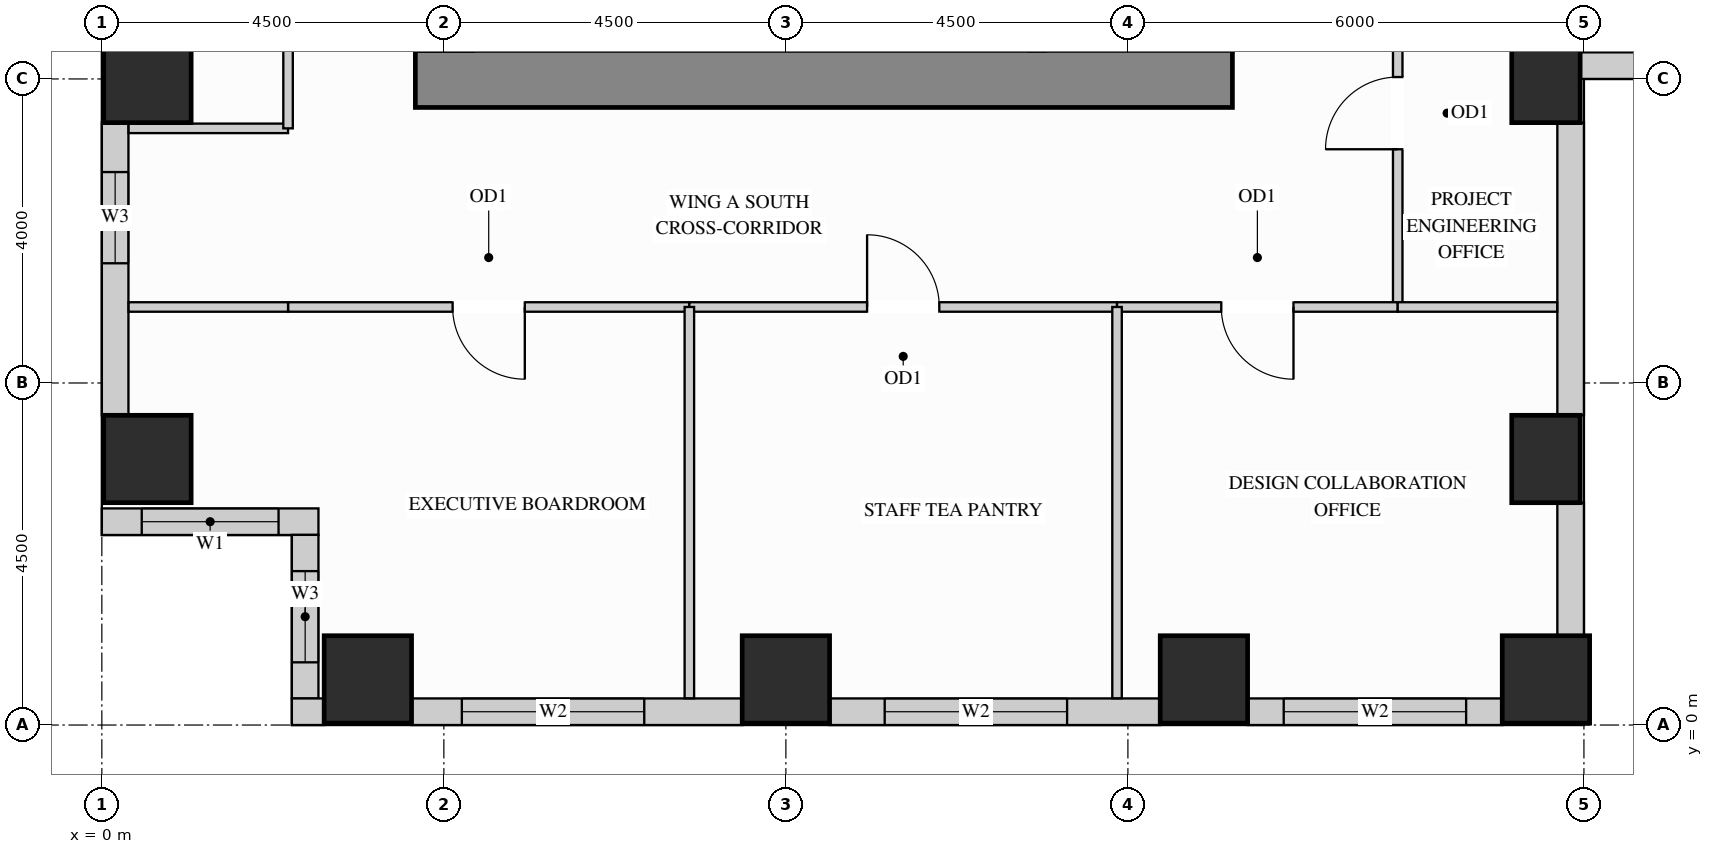
"""IFC4 building model, lengths in metres.
Left out: names, types, materials, properties, quantities, classifications, styles, units other than length and angle.
Written with IfcOpenShell. Run it as: python <this file> out.ifc"""

import sys

from ifc_helpers import new_model, si_unit, direction, frame, frame_2d, origin, origin_2d, place, context, subcontext, project, spatial, rectangle, extrude, source, transform, mapped, element, fill, save


model = new_model("IFC4")
c1 = context("Model", 3, precision=1e-05, world=origin(), true_north=direction((0.0, 1.0)))
c2 = subcontext(c1, "Body", "Model", "MODEL_VIEW")
j1 = project(units=[si_unit("LENGTHUNIT", "METRE"), si_unit("PLANEANGLEUNIT", "RADIAN")], contexts=[c1])
p1 = place(None, origin())
s1 = spatial("IfcSite", under=j1, at=p1, CompositionType="ELEMENT")
p2 = place(p1, origin())
s2 = spatial("IfcBuilding", under=s1, at=p2, CompositionType="ELEMENT")
p3 = place(p2, frame((0.0, 0.0, 131.4)))
s3 = spatial("IfcBuildingStorey", under=s2, at=p3, CompositionType="ELEMENT", Elevation=131.4)
m1 = source(origin(), c2, "Body", "SweptSolid", [
    extrude(rectangle(XDim=0.9, YDim=1.15, at=origin_2d()), origin(), (0.0, 0.0, 1.0), 3.38),
])
for number, where, z_axis, x_axis in (
    (1, (19.0, 3.5, 0.0), (0.0, 0.0, 1.0), (1.0, 0.0, 0.0)),
    (2, (19.0, 8.5, 0.0), (0.0, 0.0, 1.0), (1.0, 0.0, 0.0)),
):
    element("IfcColumn", number, at=place(p3, frame(where, z_axis=z_axis, x_axis=x_axis)), inside=s3, PredefinedType="COLUMN", context=c2, shape_type="MappedRepresentation", body=[
        mapped(m1, transform((0.0, 0.0, 0.0), x_axis=(1.0, 0.0, 0.0), y_axis=(0.0, 1.0, 0.0), z_axis=(0.0, 0.0, 1.0))),
    ])
m2 = source(origin(), c2, "Body", "SweptSolid", [
    extrude(rectangle(XDim=1.15, YDim=1.15, at=origin_2d()), origin(), (0.0, 0.0, 1.0), 3.38),
])
for number, where, z_axis, x_axis in (
    (3, (14.5, 0.6, 0.0), (0.0, 0.0, 1.0), (1.0, 0.0, 0.0)),
    (4, (19.0, 0.6, 0.0), (0.0, 0.0, 1.0), (1.0, 0.0, 0.0)),
    (5, (3.5, 0.6, 0.0), (0.0, 0.0, 1.0), (1.0, 0.0, 0.0)),
    (6, (9.0, 0.6, 0.0), (0.0, 0.0, 1.0), (1.0, 0.0, 0.0)),
    (7, (0.6, 3.5, 0.0), (0.0, 0.0, 1.0), (1.0, 0.0, 0.0)),
    (8, (0.6, 8.5, 0.0), (0.0, 0.0, 1.0), (1.0, 0.0, 0.0)),
):
    element("IfcColumn", number, at=place(p3, frame(where, z_axis=z_axis, x_axis=x_axis)), inside=s3, PredefinedType="COLUMN", context=c2, shape_type="MappedRepresentation", body=[
        mapped(m2, transform((0.0, 0.0, 0.0), x_axis=(1.0, 0.0, 0.0), y_axis=(0.0, 1.0, 0.0), z_axis=(0.0, 0.0, 1.0))),
    ])
m3 = source(origin(), c2, "Body", "SweptSolid", [
    extrude(rectangle(XDim=10.75, YDim=0.75, at=frame_2d((5.375, 0.0))), origin(), (0.0, 0.0, 1.0), 3.38),
])
p4 = place(p3, frame((4.125, 8.5, 0.0), z_axis=(0.0, 0.0, 1.0), x_axis=(1.0, 0.0, 0.0)))
e9 = element("IfcWall", 9, at=p4, inside=s3, PredefinedType="SHEAR", context=c2, shape_type="MappedRepresentation", body=[
    mapped(m3, transform((0.0, 0.0, 0.0), x_axis=(1.0, 0.0, 0.0), y_axis=(0.0, 1.0, 0.0), z_axis=(0.0, 0.0, 1.0))),
])
p5 = place(p3, frame((0.175, 7.927, 0.0), z_axis=(0.0, 0.0, 1.0), x_axis=(0.0, -1.0, 0.0)))
e10 = element("IfcWall", 10, at=p5, inside=s3, PredefinedType="SOLIDWALL", context=c2, shape_type="SweptSolid", body=[
    extrude(rectangle(XDim=3.854, YDim=0.35, at=frame_2d((1.927, 0.0))), origin(), (0.0, 0.0, 1.0), 3.365),
])
p6 = place(p5, frame((0.652, 0.0, 0.78)))
e11 = element("IfcOpeningElement", 11, at=p6, cuts=e10, PredefinedType="OPENING", context=c2, shape_type="SweptSolid", body=[
    extrude(rectangle(XDim=1.2, YDim=2.1, at=frame_2d((0.6, 1.05))), frame((0.0, 0.185, 0.0), z_axis=(0.0, -1.0, 0.0), x_axis=(1.0, 0.0, 0.0)), (0.0, 0.0, 1.0), 0.37),
])
p7 = place(p3, frame((0.0, 2.675, 0.0), z_axis=(0.0, 0.0, 1.0), x_axis=(1.0, 0.0, 0.0)))
e12 = element("IfcWall", 12, at=p7, inside=s3, PredefinedType="SOLIDWALL", context=c2, shape_type="SweptSolid", body=[
    extrude(rectangle(XDim=2.85, YDim=0.35, at=frame_2d((1.425, 0.0))), origin(), (0.0, 0.0, 1.0), 3.365),
])
p8 = place(p7, frame((0.525, 0.0, 0.78)))
e13 = element("IfcOpeningElement", 13, at=p8, cuts=e12, PredefinedType="OPENING", context=c2, shape_type="SweptSolid", body=[
    extrude(rectangle(XDim=1.8, YDim=2.1, at=frame_2d((0.9, 1.05))), frame((0.0, 0.185, 0.0), z_axis=(0.0, -1.0, 0.0), x_axis=(1.0, 0.0, 0.0)), (0.0, 0.0, 1.0), 0.37),
])
p9 = place(p3, frame((2.675, 2.502, 0.0), z_axis=(0.0, 0.0, 1.0), x_axis=(0.0, -1.0, 0.0)))
e14 = element("IfcWall", 14, at=p9, inside=s3, PredefinedType="SOLIDWALL", context=c2, shape_type="SweptSolid", body=[
    extrude(rectangle(XDim=2.154, YDim=0.35, at=frame_2d((1.077, 0.0))), origin(), (0.0, 0.0, 1.0), 3.365),
])
p10 = place(p9, frame((0.477, 0.0, 0.78)))
e15 = element("IfcOpeningElement", 15, at=p10, cuts=e14, PredefinedType="OPENING", context=c2, shape_type="SweptSolid", body=[
    extrude(rectangle(XDim=1.2, YDim=2.1, at=frame_2d((0.6, 1.05))), frame((0.0, 0.185, 0.0), z_axis=(0.0, -1.0, 0.0), x_axis=(1.0, 0.0, 0.0)), (0.0, 0.0, 1.0), 0.37),
])
m4 = source(origin(), c2, "Body", "SweptSolid", [
    extrude(rectangle(XDim=0.427, YDim=0.35, at=frame_2d((0.213, 0.0))), origin(), (0.0, 0.0, 1.0), 3.365),
])
p11 = place(p3, frame((2.5, 0.175, 0.0), z_axis=(0.0, 0.0, 1.0), x_axis=(1.0, 0.0, 0.0)))
e16 = element("IfcWall", 16, at=p11, inside=s3, PredefinedType="SOLIDWALL", context=c2, shape_type="MappedRepresentation", body=[
    mapped(m4, transform((0.0, 0.0, 0.0), x_axis=(1.0, 0.0, 0.0), y_axis=(0.0, 1.0, 0.0), z_axis=(0.0, 0.0, 1.0))),
])
p12 = place(p3, frame((4.073, 0.175, 0.0), z_axis=(0.0, 0.0, 1.0), x_axis=(1.0, 0.0, 0.0)))
e17 = element("IfcWall", 17, at=p12, inside=s3, PredefinedType="SOLIDWALL", context=c2, shape_type="SweptSolid", body=[
    extrude(rectangle(XDim=4.354, YDim=0.35, at=frame_2d((2.177, 0.0))), origin(), (0.0, 0.0, 1.0), 3.365),
])
p13 = place(p12, frame((0.664, 0.0, 0.78)))
e18 = element("IfcOpeningElement", 18, at=p13, cuts=e17, PredefinedType="OPENING", context=c2, shape_type="SweptSolid", body=[
    extrude(rectangle(XDim=2.4, YDim=2.1, at=frame_2d((1.2, 1.05))), frame((0.0, 0.185, 0.0), z_axis=(0.0, -1.0, 0.0), x_axis=(1.0, 0.0, 0.0)), (0.0, 0.0, 1.0), 0.37),
])
p14 = place(p3, frame((9.573, 0.175, 0.0), z_axis=(0.0, 0.0, 1.0), x_axis=(1.0, 0.0, 0.0)))
e19 = element("IfcWall", 19, at=p14, inside=s3, PredefinedType="SOLIDWALL", context=c2, shape_type="SweptSolid", body=[
    extrude(rectangle(XDim=4.354, YDim=0.35, at=frame_2d((2.177, 0.0))), origin(), (0.0, 0.0, 1.0), 3.365),
])
p15 = place(p14, frame((0.727, 0.0, 0.78)))
e20 = element("IfcOpeningElement", 20, at=p15, cuts=e19, PredefinedType="OPENING", context=c2, shape_type="SweptSolid", body=[
    extrude(rectangle(XDim=2.4, YDim=2.1, at=frame_2d((1.2, 1.05))), frame((0.0, 0.185, 0.0), z_axis=(0.0, -1.0, 0.0), x_axis=(1.0, 0.0, 0.0)), (0.0, 0.0, 1.0), 0.37),
])
p16 = place(p3, frame((15.073, 0.175, 0.0), z_axis=(0.0, 0.0, 1.0), x_axis=(1.0, 0.0, 0.0)))
e21 = element("IfcWall", 21, at=p16, inside=s3, PredefinedType="SOLIDWALL", context=c2, shape_type="SweptSolid", body=[
    extrude(rectangle(XDim=3.354, YDim=0.35, at=frame_2d((1.677, 0.0))), origin(), (0.0, 0.0, 1.0), 3.365),
])
p17 = place(p16, frame((0.477, 0.0, 0.78)))
e22 = element("IfcOpeningElement", 22, at=p17, cuts=e21, PredefinedType="OPENING", context=c2, shape_type="SweptSolid", body=[
    extrude(rectangle(XDim=2.4, YDim=2.1, at=frame_2d((1.2, 1.05))), frame((0.0, 0.185, 0.0), z_axis=(0.0, -1.0, 0.0), x_axis=(1.0, 0.0, 0.0)), (0.0, 0.0, 1.0), 0.37),
])
m5 = source(origin(), c2, "Body", "SweptSolid", [
    extrude(rectangle(XDim=1.754, YDim=0.35, at=frame_2d((0.877, 0.0))), origin(), (0.0, 0.0, 1.0), 2.519),
])
p18 = place(p3, frame((19.325, 1.173, 0.0), z_axis=(0.0, 0.0, 1.0), x_axis=(0.0, 1.0, 0.0)))
e23 = element("IfcWall", 23, at=p18, inside=s3, PredefinedType="SOLIDWALL", context=c2, shape_type="MappedRepresentation", body=[
    mapped(m5, transform((0.0, 0.0, 0.0), x_axis=(1.0, 0.0, 0.0), y_axis=(0.0, 1.0, 0.0), z_axis=(0.0, 0.0, 1.0))),
])
m6 = source(origin(), c2, "Body", "SweptSolid", [
    extrude(rectangle(XDim=3.854, YDim=0.35, at=frame_2d((1.927, 0.0))), origin(), (0.0, 0.0, 1.0), 2.519),
])
p19 = place(p3, frame((19.325, 4.073, 0.0), z_axis=(0.0, 0.0, 1.0), x_axis=(0.0, 1.0, 0.0)))
e24 = element("IfcWall", 24, at=p19, inside=s3, PredefinedType="SOLIDWALL", context=c2, shape_type="MappedRepresentation", body=[
    mapped(m6, transform((0.0, 0.0, 0.0), x_axis=(1.0, 0.0, 0.0), y_axis=(0.0, 1.0, 0.0), z_axis=(0.0, 0.0, 1.0))),
])
p20 = place(p3, frame((19.448, 8.675, 0.0), z_axis=(0.0, 0.0, 1.0), x_axis=(1.0, 0.0, 0.0)))
e25 = element("IfcWall", 25, at=p20, inside=s3, PredefinedType="SOLIDWALL", context=c2, shape_type="SweptSolid", body=[
    extrude(rectangle(XDim=3.504, YDim=0.35, at=frame_2d((1.752, 0.0))), origin(), (0.0, 0.0, 1.0), 3.365),
])
p21 = place(p20, frame((1.002, 0.0, 0.78)))
e26 = element("IfcOpeningElement", 26, at=p21, cuts=e25, PredefinedType="OPENING", context=c2, shape_type="SweptSolid", body=[
    extrude(rectangle(XDim=1.5, YDim=2.0, at=frame_2d((0.75, 1.0))), frame((0.0, 0.185, 0.0), z_axis=(0.0, -1.0, 0.0), x_axis=(1.0, 0.0, 0.0)), (0.0, 0.0, 1.0), 0.37),
])
p22 = place(p3, frame((17.05, 5.5, 0.0), z_axis=(0.0, 0.0, 1.0), x_axis=(0.0, 1.0, 0.0)))
e27 = element("IfcWall", 27, at=p22, inside=s3, PredefinedType="PARTITIONING", context=c2, shape_type="SweptSolid", body=[
    extrude(rectangle(XDim=5.1, YDim=0.125, at=frame_2d((2.55, 0.0))), origin(), (0.0, 0.0, 1.0), 3.365),
])
p23 = place(p22, frame((2.075, 0.0, 0.0)))
e28 = element("IfcOpeningElement", 28, at=p23, cuts=e27, PredefinedType="OPENING", context=c2, shape_type="SweptSolid", body=[
    extrude(rectangle(XDim=0.95, YDim=2.15, at=frame_2d((0.475, 1.075))), frame((0.0, 0.073, 0.0), z_axis=(0.0, -1.0, 0.0), x_axis=(1.0, 0.0, 0.0)), (0.0, 0.0, 1.0), 0.145),
])
m7 = source(origin(), c2, "Body", "SweptSolid", [
    extrude(rectangle(XDim=2.098, YDim=0.125, at=frame_2d((1.049, 0.0))), origin(), (0.0, 0.0, 1.0), 3.365),
])
p24 = place(p3, frame((0.352, 7.85, 0.0), z_axis=(0.0, 0.0, 1.0), x_axis=(1.0, 0.0, 0.0)))
e29 = element("IfcWall", 29, at=p24, inside=s3, PredefinedType="PARTITIONING", context=c2, shape_type="MappedRepresentation", body=[
    mapped(m7, transform((0.0, 0.0, 0.0), x_axis=(1.0, 0.0, 0.0), y_axis=(0.0, 1.0, 0.0), z_axis=(0.0, 0.0, 1.0))),
])
p25 = place(p3, frame((2.45, 5.5, 0.0), z_axis=(0.0, 0.0, 1.0), x_axis=(1.0, 0.0, 0.0)))
e30 = element("IfcWall", 30, at=p25, inside=s3, PredefinedType="PARTITIONING", context=c2, shape_type="SweptSolid", body=[
    extrude(rectangle(XDim=5.28, YDim=0.125, at=frame_2d((2.64, 0.0))), origin(), (0.0, 0.0, 1.0), 3.365),
])
p26 = place(p25, frame((2.165, 0.0, 0.0)))
e31 = element("IfcOpeningElement", 31, at=p26, cuts=e30, PredefinedType="OPENING", context=c2, shape_type="SweptSolid", body=[
    extrude(rectangle(XDim=0.95, YDim=2.15, at=frame_2d((0.475, 1.075))), frame((0.0, 0.073, 0.0), z_axis=(0.0, -1.0, 0.0), x_axis=(1.0, 0.0, 0.0)), (0.0, 0.0, 1.0), 0.145),
])
p27 = place(p3, frame((7.73, 5.5, 0.0), z_axis=(0.0, 0.0, 1.0), x_axis=(1.0, 0.0, 0.0)))
e32 = element("IfcWall", 32, at=p27, inside=s3, PredefinedType="PARTITIONING", context=c2, shape_type="SweptSolid", body=[
    extrude(rectangle(XDim=5.627, YDim=0.125, at=frame_2d((2.813, 0.0))), origin(), (0.0, 0.0, 1.0), 3.365),
])
p28 = place(p27, frame((2.338, 0.0, 0.0)))
e33 = element("IfcOpeningElement", 33, at=p28, cuts=e32, PredefinedType="OPENING", context=c2, shape_type="SweptSolid", body=[
    extrude(rectangle(XDim=0.95, YDim=2.15, at=frame_2d((0.475, 1.075))), frame((0.0, 0.073, 0.0), z_axis=(0.0, -1.0, 0.0), x_axis=(1.0, 0.0, 0.0)), (0.0, 0.0, 1.0), 0.145),
])
p29 = place(p3, frame((13.357, 5.5, 0.0), z_axis=(0.0, 0.0, 1.0), x_axis=(1.0, 0.0, 0.0)))
e34 = element("IfcWall", 34, at=p29, inside=s3, PredefinedType="PARTITIONING", context=c2, shape_type="SweptSolid", body=[
    extrude(rectangle(XDim=3.693, YDim=0.125, at=frame_2d((1.847, 0.0))), origin(), (0.0, 0.0, 1.0), 3.365),
])
p30 = place(p29, frame((1.372, 0.0, 0.0)))
e35 = element("IfcOpeningElement", 35, at=p30, cuts=e34, PredefinedType="OPENING", context=c2, shape_type="SweptSolid", body=[
    extrude(rectangle(XDim=0.95, YDim=2.15, at=frame_2d((0.475, 1.075))), frame((0.0, 0.073, 0.0), z_axis=(0.0, -1.0, 0.0), x_axis=(1.0, 0.0, 0.0)), (0.0, 0.0, 1.0), 0.145),
])
for number, where, z_axis, x_axis in (
    (36, (0.352, 5.5, 0.0), (0.0, 0.0, 1.0), (1.0, 0.0, 0.0)),
    (37, (17.05, 5.5, 0.0), (0.0, 0.0, 1.0), (1.0, 0.0, 0.0)),
):
    element("IfcWall", number, at=place(p3, frame(where, z_axis=z_axis, x_axis=x_axis)), inside=s3, PredefinedType="PARTITIONING", context=c2, shape_type="MappedRepresentation", body=[
        mapped(m7, transform((0.0, 0.0, 0.0), x_axis=(1.0, 0.0, 0.0), y_axis=(0.0, 1.0, 0.0), z_axis=(0.0, 0.0, 1.0))),
    ])
m8 = source(origin(), c2, "Body", "SweptSolid", [
    extrude(rectangle(XDim=5.148, YDim=0.125, at=frame_2d((2.574, 0.0))), origin(), (0.0, 0.0, 1.0), 3.365),
])
for number, where, z_axis, x_axis in (
    (38, (7.73, 0.352, 0.0), (0.0, 0.0, 1.0), (0.0, 1.0, 0.0)),
    (39, (13.357, 0.352, 0.0), (0.0, 0.0, 1.0), (0.0, 1.0, 0.0)),
):
    element("IfcWall", number, at=place(p3, frame(where, z_axis=z_axis, x_axis=x_axis)), inside=s3, PredefinedType="PARTITIONING", context=c2, shape_type="MappedRepresentation", body=[
        mapped(m8, transform((0.0, 0.0, 0.0), x_axis=(1.0, 0.0, 0.0), y_axis=(0.0, 1.0, 0.0), z_axis=(0.0, 0.0, 1.0))),
    ])
p31 = place(p3, frame((2.45, 7.85, 0.0), z_axis=(0.0, 0.0, 1.0), x_axis=(0.0, 1.0, 0.0)))
e40 = element("IfcWall", 40, at=p31, inside=s3, PredefinedType="PARTITIONING", context=c2, shape_type="SweptSolid", body=[
    extrude(rectangle(XDim=7.25, YDim=0.125, at=frame_2d((3.625, 0.0))), origin(), (0.0, 0.0, 1.0), 3.365),
])
p32 = place(p31, frame((3.15, 0.0, 0.0)))
e41 = element("IfcOpeningElement", 41, at=p32, cuts=e40, PredefinedType="OPENING", context=c2, shape_type="SweptSolid", body=[
    extrude(rectangle(XDim=0.95, YDim=2.15, at=frame_2d((0.475, 1.075))), frame((0.0, 0.073, 0.0), z_axis=(0.0, -1.0, 0.0), x_axis=(1.0, 0.0, 0.0)), (0.0, 0.0, 1.0), 0.145),
])
m9 = source(origin(), c2, "Body", "SweptSolid", [
    extrude(rectangle(XDim=0.95, YDim=2.15, at=frame_2d((0.475, 1.075))), frame((0.0, 0.025, 0.0), z_axis=(0.0, -1.0, 0.0), x_axis=(1.0, 0.0, 0.0)), (0.0, 0.0, 1.0), 0.05),
])
p33 = place(p23, origin())
e42 = element("IfcDoor", 42, at=p33, inside=s3, OperationType="SINGLE_SWING_LEFT", PredefinedType="DOOR", context=c2, shape_type="MappedRepresentation", body=[
    mapped(m9, transform((0.0, 0.0, 0.0), x_axis=(1.0, 0.0, 0.0), y_axis=(0.0, 1.0, 0.0), z_axis=(0.0, 0.0, 1.0))),
])
fill(e28, e42)
p34 = place(p26, origin())
e43 = element("IfcDoor", 43, at=p34, inside=s3, OperationType="SINGLE_SWING_RIGHT", PredefinedType="DOOR", context=c2, shape_type="MappedRepresentation", body=[
    mapped(m9, transform((0.0, 0.0, 0.0), x_axis=(1.0, 0.0, 0.0), y_axis=(0.0, 1.0, 0.0), z_axis=(0.0, 0.0, 1.0))),
])
fill(e31, e43)
p35 = place(p28, origin())
e44 = element("IfcDoor", 44, at=p35, inside=s3, OperationType="SINGLE_SWING_LEFT", PredefinedType="DOOR", context=c2, shape_type="MappedRepresentation", body=[
    mapped(m9, transform((0.0, 0.0, 0.0), x_axis=(1.0, 0.0, 0.0), y_axis=(0.0, 1.0, 0.0), z_axis=(0.0, 0.0, 1.0))),
])
fill(e33, e44)
p36 = place(p30, origin())
e45 = element("IfcDoor", 45, at=p36, inside=s3, OperationType="SINGLE_SWING_RIGHT", PredefinedType="DOOR", context=c2, shape_type="MappedRepresentation", body=[
    mapped(m9, transform((0.0, 0.0, 0.0), x_axis=(1.0, 0.0, 0.0), y_axis=(0.0, 1.0, 0.0), z_axis=(0.0, 0.0, 1.0))),
])
fill(e35, e45)
m10 = source(origin(), c2, "Body", "SweptSolid", [
    extrude(rectangle(XDim=1.8, YDim=2.1, at=frame_2d((0.9, 1.05))), frame((0.0, 0.03, 0.0), z_axis=(0.0, -1.0, 0.0), x_axis=(1.0, 0.0, 0.0)), (0.0, 0.0, 1.0), 0.06),
])
p37 = place(p8, origin())
e46 = element("IfcWindow", 46, at=p37, inside=s3, PartitioningType="SINGLE_PANEL", PredefinedType="WINDOW", context=c2, shape_type="MappedRepresentation", body=[
    mapped(m10, transform((0.0, 0.0, 0.0), x_axis=(1.0, 0.0, 0.0), y_axis=(0.0, 1.0, 0.0), z_axis=(0.0, 0.0, 1.0))),
])
fill(e13, e46)
m11 = source(origin(), c2, "Body", "SweptSolid", [
    extrude(rectangle(XDim=2.4, YDim=2.1, at=frame_2d((1.2, 1.05))), frame((0.0, 0.03, 0.0), z_axis=(0.0, -1.0, 0.0), x_axis=(1.0, 0.0, 0.0)), (0.0, 0.0, 1.0), 0.06),
])
p38 = place(p13, origin())
e47 = element("IfcWindow", 47, at=p38, inside=s3, PartitioningType="SINGLE_PANEL", PredefinedType="WINDOW", context=c2, shape_type="MappedRepresentation", body=[
    mapped(m11, transform((0.0, 0.0, 0.0), x_axis=(1.0, 0.0, 0.0), y_axis=(0.0, 1.0, 0.0), z_axis=(0.0, 0.0, 1.0))),
])
fill(e18, e47)
p39 = place(p15, origin())
e48 = element("IfcWindow", 48, at=p39, inside=s3, PartitioningType="SINGLE_PANEL", PredefinedType="WINDOW", context=c2, shape_type="MappedRepresentation", body=[
    mapped(m11, transform((0.0, 0.0, 0.0), x_axis=(1.0, 0.0, 0.0), y_axis=(0.0, 1.0, 0.0), z_axis=(0.0, 0.0, 1.0))),
])
fill(e20, e48)
p40 = place(p17, origin())
e49 = element("IfcWindow", 49, at=p40, inside=s3, PartitioningType="SINGLE_PANEL", PredefinedType="WINDOW", context=c2, shape_type="MappedRepresentation", body=[
    mapped(m11, transform((0.0, 0.0, 0.0), x_axis=(1.0, 0.0, 0.0), y_axis=(0.0, 1.0, 0.0), z_axis=(0.0, 0.0, 1.0))),
])
fill(e22, e49)
m12 = source(origin(), c2, "Body", "SweptSolid", [
    extrude(rectangle(XDim=1.2, YDim=2.1, at=frame_2d((0.6, 1.05))), frame((0.0, 0.03, 0.0), z_axis=(0.0, -1.0, 0.0), x_axis=(1.0, 0.0, 0.0)), (0.0, 0.0, 1.0), 0.06),
])
p41 = place(p6, origin())
e50 = element("IfcWindow", 50, at=p41, inside=s3, PartitioningType="SINGLE_PANEL", PredefinedType="WINDOW", context=c2, shape_type="MappedRepresentation", body=[
    mapped(m12, transform((0.0, 0.0, 0.0), x_axis=(1.0, 0.0, 0.0), y_axis=(0.0, 1.0, 0.0), z_axis=(0.0, 0.0, 1.0))),
])
fill(e11, e50)
p42 = place(p10, origin())
e51 = element("IfcWindow", 51, at=p42, inside=s3, PartitioningType="SINGLE_PANEL", PredefinedType="WINDOW", context=c2, shape_type="MappedRepresentation", body=[
    mapped(m12, transform((0.0, 0.0, 0.0), x_axis=(1.0, 0.0, 0.0), y_axis=(0.0, 1.0, 0.0), z_axis=(0.0, 0.0, 1.0))),
])
fill(e15, e51)
save(model, sys.argv[1])
